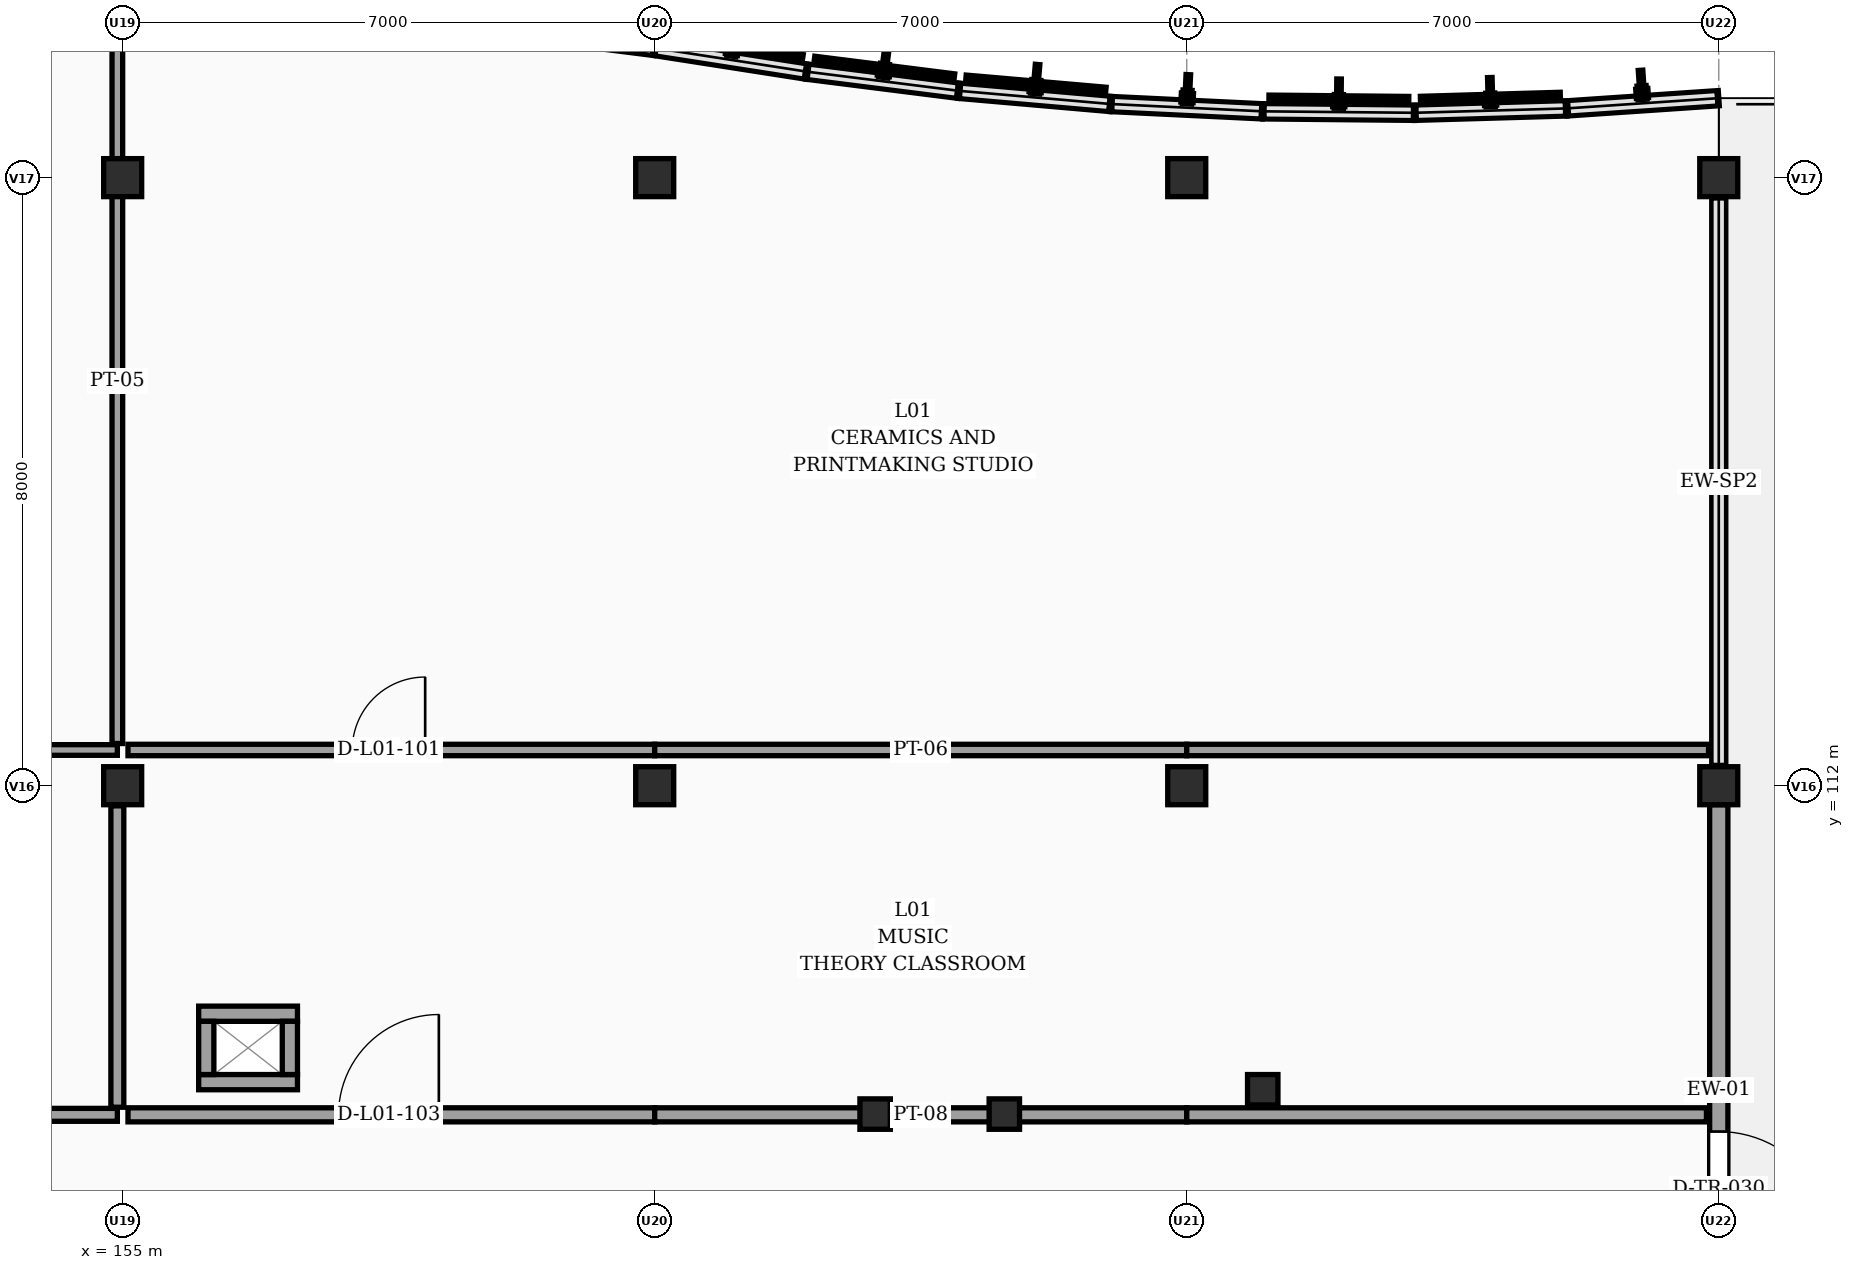
"""IFC4 building model, lengths in metres.
Left out: names, types, materials, properties, quantities, classifications, styles, units other than length and angle.
Written with IfcOpenShell. Run it as: python <this file> out.ifc"""

import sys

from ifc_helpers import new_model, si_unit, direction, frame, frame_2d, origin, origin_2d, place, context, subcontext, project, spatial, rectangle, extrude, element, fill, save


model = new_model("IFC4")
c1 = context("Model", 3, precision=1e-05, world=origin(), true_north=direction((0.0, 1.0)))
c2 = subcontext(c1, "Body", "Model", "MODEL_VIEW")
j1 = project(units=[si_unit("LENGTHUNIT", "METRE"), si_unit("PLANEANGLEUNIT", "RADIAN")], contexts=[c1])
p1 = place(None, origin())
s1 = spatial("IfcSite", under=j1, at=p1, CompositionType="ELEMENT")
p2 = place(p1, origin())
s2 = spatial("IfcBuilding", under=s1, at=p2, CompositionType="ELEMENT")
p3 = place(p2, frame((0.0, 0.0, 4.5)))
s3 = spatial("IfcBuildingStorey", under=s2, at=p3, CompositionType="ELEMENT", Elevation=4.5)
for number, where, z_axis, x_axis in (
    (1, (155.0, 112.0, 0.0), (0.0, 0.0, 1.0), (1.0, 0.0, 0.0)),
    (2, (155.0, 120.0, 0.0), (0.0, 0.0, 1.0), (1.0, 0.0, 0.0)),
    (3, (162.0, 112.0, 0.0), (0.0, 0.0, 1.0), (1.0, 0.0, 0.0)),
    (4, (162.0, 120.0, 0.0), (0.0, 0.0, 1.0), (1.0, 0.0, 0.0)),
    (5, (169.0, 112.0, 0.0), (0.0, 0.0, 1.0), (1.0, 0.0, 0.0)),
    (6, (169.0, 120.0, 0.0), (0.0, 0.0, 1.0), (1.0, 0.0, 0.0)),
    (7, (176.0, 112.0, 0.0), (0.0, 0.0, 1.0), (1.0, 0.0, 0.0)),
    (8, (176.0, 120.0, 0.0), (0.0, 0.0, 1.0), (1.0, 0.0, 0.0)),
):
    element("IfcColumn", number, at=place(p3, frame(where, z_axis=z_axis, x_axis=x_axis)), inside=s3, PredefinedType="COLUMN", context=c2, shape_type="SweptSolid", body=[
        extrude(rectangle(XDim=0.5, YDim=0.5, at=origin_2d()), origin(), (0.0, 0.0, 1.0), 3.9),
    ])
p4 = place(p3, frame((170.0, 108.0, 0.0), z_axis=(0.0, 0.0, 1.0), x_axis=(1.0, 0.0, 0.0)))
e9 = element("IfcColumn", 9, at=p4, inside=s3, PredefinedType="COLUMN", context=c2, shape_type="SweptSolid", body=[
    extrude(rectangle(XDim=0.4, YDim=0.4, at=origin_2d()), origin(), (0.0, 0.0, 1.0), 3.9),
])
p5 = place(p3, frame((160.0, 121.958, 0.0), z_axis=(0.0, 0.0, 1.0), x_axis=(0.992158168336, -0.124988675503, 0.0)))
e10 = element("IfcWall", 10, at=p5, inside=s3, PredefinedType="SOLIDWALL", context=c2, shape_type="SweptSolid", body=[
    extrude(rectangle(XDim=2.016, YDim=0.2, at=frame_2d((1.008, 0.0))), origin(), (0.0, 0.0, 1.0), 0.95),
])
p6 = place(p3, frame((162.0, 121.706, 0.0), z_axis=(0.0, 0.0, 1.0), x_axis=(0.988085509852, -0.153905897287, 0.0)))
e11 = element("IfcWall", 11, at=p6, inside=s3, PredefinedType="SOLIDWALL", context=c2, shape_type="SweptSolid", body=[
    extrude(rectangle(XDim=2.024, YDim=0.2, at=frame_2d((1.012, 0.0))), origin(), (0.0, 0.0, 1.0), 0.95),
])
p7 = place(p3, frame((164.0, 121.394, 0.0), z_axis=(0.0, 0.0, 1.0), x_axis=(0.992158168336, -0.124988675503, 0.0)))
e12 = element("IfcWall", 12, at=p7, inside=s3, PredefinedType="SOLIDWALL", context=c2, shape_type="SweptSolid", body=[
    extrude(rectangle(XDim=2.016, YDim=0.2, at=frame_2d((1.008, 0.0))), origin(), (0.0, 0.0, 1.0), 0.95),
])
p8 = place(p3, frame((166.0, 121.142, 0.0), z_axis=(0.0, 0.0, 1.0), x_axis=(0.996244237948, -0.086587633962, 0.0)))
e13 = element("IfcWall", 13, at=p8, inside=s3, PredefinedType="SOLIDWALL", context=c2, shape_type="SweptSolid", body=[
    extrude(rectangle(XDim=2.008, YDim=0.2, at=frame_2d((1.004, 0.0))), origin(), (0.0, 0.0, 1.0), 0.95),
])
p9 = place(p3, frame((168.0, 120.969, 0.0), z_axis=(0.0, 0.0, 1.0), x_axis=(0.99884540439, -0.048040172037, 0.0)))
e14 = element("IfcWall", 14, at=p9, inside=s3, PredefinedType="SOLIDWALL", context=c2, shape_type="SweptSolid", body=[
    extrude(rectangle(XDim=2.002, YDim=0.2, at=frame_2d((1.001, 0.0))), origin(), (0.0, 0.0, 1.0), 0.95),
])
p10 = place(p3, frame((170.0, 120.872, 0.0), z_axis=(0.0, 0.0, 1.0), x_axis=(0.999953504169, -0.009643106302, 0.0)))
e15 = element("IfcWall", 15, at=p10, inside=s3, PredefinedType="SOLIDWALL", context=c2, shape_type="SweptSolid", body=[
    extrude(rectangle(XDim=2.0, YDim=0.2, at=frame_2d((1.0, 0.0))), origin(), (0.0, 0.0, 1.0), 0.95),
])
p11 = place(p3, frame((172.0, 120.853, 0.0), z_axis=(0.0, 0.0, 1.0), x_axis=(0.999585290582, 0.028796646555, 0.0)))
e16 = element("IfcWall", 16, at=p11, inside=s3, PredefinedType="SOLIDWALL", context=c2, shape_type="SweptSolid", body=[
    extrude(rectangle(XDim=2.001, YDim=0.2, at=frame_2d((1.0, 0.0))), origin(), (0.0, 0.0, 1.0), 0.95),
])
p12 = place(p3, frame((174.0, 120.911, 0.0), z_axis=(0.0, 0.0, 1.0), x_axis=(0.997729302978, 0.067351599676, 0.0)))
e17 = element("IfcWall", 17, at=p12, inside=s3, PredefinedType="SOLIDWALL", context=c2, shape_type="SweptSolid", body=[
    extrude(rectangle(XDim=2.005, YDim=0.2, at=frame_2d((1.002, 0.0))), origin(), (0.0, 0.0, 1.0), 0.95),
])
p13 = place(p3, frame((176.0, 119.75, 0.0), z_axis=(0.0, 0.0, 1.0), x_axis=(0.0, -1.0, 0.0)))
e18 = element("IfcWall", 18, at=p13, inside=s3, PredefinedType="SOLIDWALL", context=c2, shape_type="SweptSolid", body=[
    extrude(rectangle(XDim=7.5, YDim=0.185, at=frame_2d((3.75, 0.0))), origin(), (0.0, 0.0, 1.0), 0.95),
])
p14 = place(p3, frame((176.0, 111.75, 0.0), z_axis=(0.0, 0.0, 1.0), x_axis=(0.0, -1.0, 0.0)))
e19 = element("IfcWall", 19, at=p14, inside=s3, PredefinedType="SOLIDWALL", context=c2, shape_type="SweptSolid", body=[
    extrude(rectangle(XDim=7.5, YDim=0.24, at=frame_2d((3.75, 0.0))), origin(), (0.0, 0.0, 1.0), 2.948),
])
p15 = place(p14, frame((4.3, 0.0, 0.0)))
e20 = element("IfcOpeningElement", 20, at=p15, cuts=e19, PredefinedType="OPENING", context=c2, shape_type="SweptSolid", body=[
    extrude(rectangle(XDim=1.5, YDim=2.15, at=frame_2d((0.75, 1.075))), frame((0.0, 0.13, 0.0), z_axis=(0.0, -1.0, 0.0), x_axis=(1.0, 0.0, 0.0)), (0.0, 0.0, 1.0), 0.26),
])
for number, where, z_axis, x_axis in (
    (21, (157.3, 108.1, 0.0), (0.0, 0.0, 1.0), (-1.0, 0.0, 0.0)),
    (22, (156.0, 109.0, 0.0), (0.0, 0.0, 1.0), (1.0, 0.0, 0.0)),
):
    element("IfcWall", number, at=place(p3, frame(where, z_axis=z_axis, x_axis=x_axis)), inside=s3, PredefinedType="PARTITIONING", context=c2, shape_type="SweptSolid", body=[
        extrude(rectangle(XDim=1.3, YDim=0.2, at=frame_2d((0.65, 0.0))), origin(), (0.0, 0.0, 1.0), 3.65),
    ])
p16 = place(p3, frame((156.1, 108.2, 0.0), z_axis=(0.0, 0.0, 1.0), x_axis=(0.0, 1.0, 0.0)))
e23 = element("IfcWall", 23, at=p16, inside=s3, PredefinedType="PARTITIONING", context=c2, shape_type="SweptSolid", body=[
    extrude(rectangle(XDim=0.7, YDim=0.2, at=frame_2d((0.35, 0.0))), origin(), (0.0, 0.0, 1.0), 3.65),
])
p17 = place(p3, frame((157.2, 108.9, 0.0), z_axis=(0.0, 0.0, 1.0), x_axis=(0.0, -1.0, 0.0)))
e24 = element("IfcWall", 24, at=p17, inside=s3, PredefinedType="PARTITIONING", context=c2, shape_type="SweptSolid", body=[
    extrude(rectangle(XDim=0.7, YDim=0.2, at=frame_2d((0.35, 0.0))), origin(), (0.0, 0.0, 1.0), 3.245),
])
for number, where, z_axis, x_axis in (
    (25, (166.6, 107.68, 0.0), (0.0, 0.0, 1.0), (1.0, 0.0, 0.0)),
    (26, (164.9, 107.68, 0.0), (0.0, 0.0, 1.0), (1.0, 0.0, 0.0)),
):
    element("IfcColumn", number, at=place(p3, frame(where, z_axis=z_axis, x_axis=x_axis)), inside=s3, PredefinedType="COLUMN", context=c2, shape_type="SweptSolid", body=[
        extrude(rectangle(XDim=0.4, YDim=0.4, at=origin_2d()), origin(), (0.0, 0.0, 1.0), 3.9),
    ])
p18 = place(p3, frame((148.0, 112.47, 0.0), z_axis=(0.0, 0.0, 1.0), x_axis=(1.0, 0.0, 0.0)))
e27 = element("IfcWall", 27, at=p18, inside=s3, PredefinedType="PARTITIONING", context=c2, shape_type="SweptSolid", body=[
    extrude(rectangle(XDim=6.93, YDim=0.14, at=frame_2d((3.465, 0.0))), origin(), (0.0, 0.0, 1.0), 2.995),
])
p19 = place(p3, frame((154.93, 112.555, 0.0), z_axis=(0.0, 0.0, 1.0), x_axis=(0.0, 1.0, 0.0)))
e28 = element("IfcWall", 28, at=p19, inside=s3, PredefinedType="PARTITIONING", context=c2, shape_type="SweptSolid", body=[
    extrude(rectangle(XDim=9.541, YDim=0.14, at=frame_2d((4.771, 0.0))), origin(), (0.0, 0.0, 1.0), 2.995),
])
p20 = place(p3, frame((155.07, 112.47, 0.0), z_axis=(0.0, 0.0, 1.0), x_axis=(1.0, 0.0, 0.0)))
e29 = element("IfcWall", 29, at=p20, inside=s3, PredefinedType="PARTITIONING", context=c2, shape_type="SweptSolid", body=[
    extrude(rectangle(XDim=6.93, YDim=0.15, at=frame_2d((3.465, 0.0))), origin(), (0.0, 0.0, 1.0), 2.995),
])
p21 = place(p20, frame((2.95, 0.0, 0.0)))
e30 = element("IfcOpeningElement", 30, at=p21, cuts=e29, PredefinedType="OPENING", context=c2, shape_type="SweptSolid", body=[
    extrude(rectangle(XDim=0.96, YDim=2.15, at=frame_2d((0.48, 1.075))), frame((0.0, 0.085, 0.0), z_axis=(0.0, -1.0, 0.0), x_axis=(1.0, 0.0, 0.0)), (0.0, 0.0, 1.0), 0.17),
])
p22 = place(p3, frame((162.0, 112.47, 0.0), z_axis=(0.0, 0.0, 1.0), x_axis=(1.0, 0.0, 0.0)))
e31 = element("IfcWall", 31, at=p22, inside=s3, PredefinedType="PARTITIONING", context=c2, shape_type="SweptSolid", body=[
    extrude(rectangle(XDim=7.0, YDim=0.15, at=frame_2d((3.5, 0.0))), origin(), (0.0, 0.0, 1.0), 2.995),
])
p23 = place(p3, frame((169.0, 112.47, 0.0), z_axis=(0.0, 0.0, 1.0), x_axis=(1.0, 0.0, 0.0)))
e32 = element("IfcWall", 32, at=p23, inside=s3, PredefinedType="PARTITIONING", context=c2, shape_type="SweptSolid", body=[
    extrude(rectangle(XDim=6.865, YDim=0.15, at=frame_2d((3.433, 0.0))), origin(), (0.0, 0.0, 1.0), 2.998),
])
p24 = place(p3, frame((148.0, 107.67, 0.0), z_axis=(0.0, 0.0, 1.0), x_axis=(1.0, 0.0, 0.0)))
e33 = element("IfcWall", 33, at=p24, inside=s3, PredefinedType="PARTITIONING", context=c2, shape_type="SweptSolid", body=[
    extrude(rectangle(XDim=6.93, YDim=0.17, at=frame_2d((3.465, 0.0))), origin(), (0.0, 0.0, 1.0), 3.65),
])
p25 = place(p3, frame((154.93, 107.77, 0.0), z_axis=(0.0, 0.0, 1.0), x_axis=(0.0, 1.0, 0.0)))
e34 = element("IfcWall", 34, at=p25, inside=s3, PredefinedType="PARTITIONING", context=c2, shape_type="SweptSolid", body=[
    extrude(rectangle(XDim=3.965, YDim=0.17, at=frame_2d((1.982, 0.0))), origin(), (0.0, 0.0, 1.0), 2.995),
])
p26 = place(p3, frame((155.07, 107.67, 0.0), z_axis=(0.0, 0.0, 1.0), x_axis=(1.0, 0.0, 0.0)))
e35 = element("IfcWall", 35, at=p26, inside=s3, PredefinedType="PARTITIONING", context=c2, shape_type="SweptSolid", body=[
    extrude(rectangle(XDim=6.93, YDim=0.185, at=frame_2d((3.465, 0.0))), origin(), (0.0, 0.0, 1.0), 3.65),
])
p27 = place(p26, frame((2.77, 0.0, 0.0)))
e36 = element("IfcOpeningElement", 36, at=p27, cuts=e35, PredefinedType="OPENING", context=c2, shape_type="SweptSolid", body=[
    extrude(rectangle(XDim=1.32, YDim=2.2, at=frame_2d((0.66, 1.1))), frame((0.0, 0.103, 0.0), z_axis=(0.0, -1.0, 0.0), x_axis=(1.0, 0.0, 0.0)), (0.0, 0.0, 1.0), 0.205),
])
p28 = place(p3, frame((162.0, 107.67, 0.0), z_axis=(0.0, 0.0, 1.0), x_axis=(1.0, 0.0, 0.0)))
e37 = element("IfcWall", 37, at=p28, inside=s3, PredefinedType="PARTITIONING", context=c2, shape_type="SweptSolid", body=[
    extrude(rectangle(XDim=7.0, YDim=0.185, at=frame_2d((3.5, 0.0))), origin(), (0.0, 0.0, 1.0), 3.65),
])
p29 = place(p3, frame((169.0, 107.67, 0.0), z_axis=(0.0, 0.0, 1.0), x_axis=(1.0, 0.0, 0.0)))
e38 = element("IfcWall", 38, at=p29, inside=s3, PredefinedType="PARTITIONING", context=c2, shape_type="SweptSolid", body=[
    extrude(rectangle(XDim=6.838, YDim=0.185, at=frame_2d((3.419, 0.0))), origin(), (0.0, 0.0, 1.0), 3.65),
])
p30 = place(p15, origin())
e39 = element("IfcDoor", 39, at=p30, inside=s3, OperationType="SINGLE_SWING_RIGHT", PredefinedType="DOOR", context=c2, shape_type="SweptSolid", body=[
    extrude(rectangle(XDim=1.5, YDim=2.15, at=frame_2d((0.75, 1.075))), frame((0.0, 0.025, 0.0), z_axis=(0.0, -1.0, 0.0), x_axis=(1.0, 0.0, 0.0)), (0.0, 0.0, 1.0), 0.05),
])
fill(e20, e39)
p31 = place(p21, origin())
e40 = element("IfcDoor", 40, at=p31, inside=s3, OperationType="SINGLE_SWING_RIGHT", PredefinedType="DOOR", context=c2, shape_type="SweptSolid", body=[
    extrude(rectangle(XDim=0.96, YDim=2.15, at=frame_2d((0.48, 1.075))), frame((0.0, 0.025, 0.0), z_axis=(0.0, -1.0, 0.0), x_axis=(1.0, 0.0, 0.0)), (0.0, 0.0, 1.0), 0.05),
])
fill(e30, e40)
p32 = place(p27, origin())
e41 = element("IfcDoor", 41, at=p32, inside=s3, OperationType="SINGLE_SWING_RIGHT", PredefinedType="DOOR", context=c2, shape_type="SweptSolid", body=[
    extrude(rectangle(XDim=1.32, YDim=2.2, at=frame_2d((0.66, 1.1))), frame((0.0, 0.025, 0.0), z_axis=(0.0, -1.0, 0.0), x_axis=(1.0, 0.0, 0.0)), (0.0, 0.0, 1.0), 0.05),
])
fill(e36, e41)
save(model, sys.argv[1])
